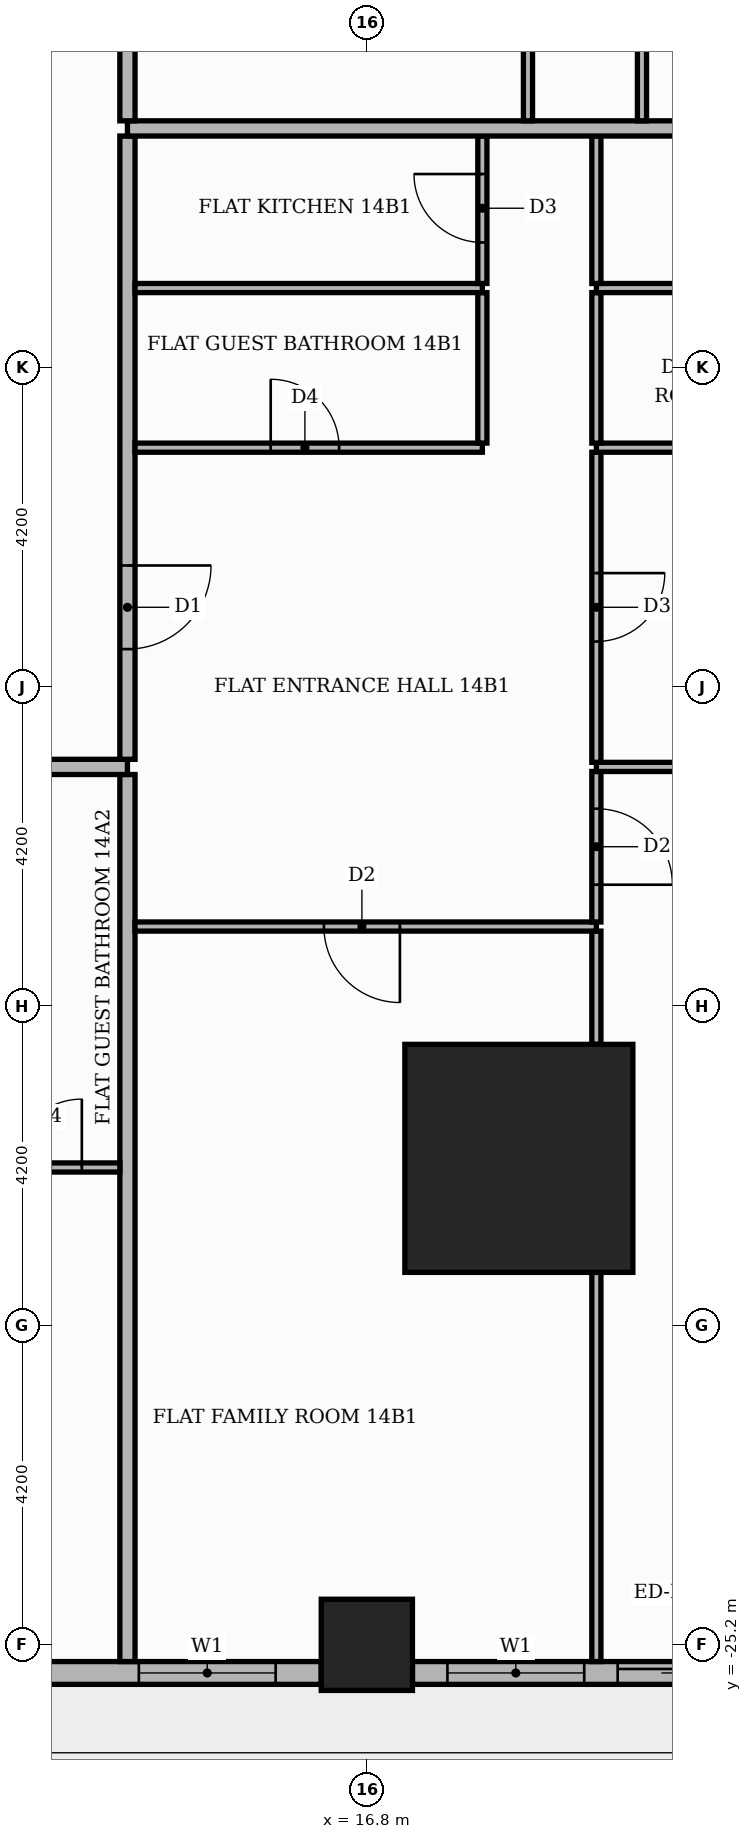
"""IFC4 building model, lengths in metres.
Left out: names, types, materials, properties, quantities, classifications, styles, units other than length and angle.
Written with IfcOpenShell. Run it as: python <this file> out.ifc"""

import sys

from ifc_helpers import new_model, si_unit, direction, frame, frame_2d, origin, origin_2d, place, context, subcontext, project, spatial, rectangle, extrude, element, fill, save


model = new_model("IFC4")
c1 = context("Model", 3, precision=1e-05, world=origin(), true_north=direction((0.0, 1.0)))
c2 = subcontext(c1, "Body", "Model", "MODEL_VIEW")
j1 = project(units=[si_unit("LENGTHUNIT", "METRE"), si_unit("PLANEANGLEUNIT", "RADIAN")], contexts=[c1])
p1 = place(None, origin())
s1 = spatial("IfcSite", under=j1, at=p1, CompositionType="ELEMENT")
p2 = place(p1, origin())
s2 = spatial("IfcBuilding", under=s1, at=p2, CompositionType="ELEMENT")
p3 = place(p2, frame((0.0, 0.0, 62.1)))
s3 = spatial("IfcBuildingStorey", under=s2, at=p3, CompositionType="ELEMENT", Elevation=62.1)
p4 = place(p3, frame((18.8, -18.8, 0.0), z_axis=(0.0, 0.0, 1.0), x_axis=(1.0, 0.0, 0.0)))
e1 = element("IfcColumn", 1, at=p4, inside=s3, PredefinedType="COLUMN", context=c2, shape_type="SweptSolid", body=[
    extrude(rectangle(XDim=3.0, YDim=3.0, at=origin_2d()), origin(), (0.0, 0.0, 1.0), 3.9),
])
p5 = place(p3, frame((16.8, -25.2, 0.0), z_axis=(0.0, 0.0, 1.0), x_axis=(1.0, 0.0, 0.0)))
e2 = element("IfcColumn", 2, at=p5, inside=s3, PredefinedType="COLUMN", context=c2, shape_type="SweptSolid", body=[
    extrude(rectangle(XDim=1.2, YDim=1.2, at=origin_2d()), origin(), (0.0, 0.0, 1.0), 3.9),
])
p6 = place(p3, frame((11.85, -25.57, 0.0), z_axis=(0.0, 0.0, 1.0), x_axis=(1.0, 0.0, 0.0)))
e3 = element("IfcWall", 3, at=p6, inside=s3, PredefinedType="STANDARD", context=c2, shape_type="SweptSolid", body=[
    extrude(rectangle(XDim=4.35, YDim=0.3, at=frame_2d((2.175, 0.0))), origin(), (0.0, 0.0, 1.0), 3.48),
])
p7 = place(p6, frame((1.95, 0.0, 0.9)))
e4 = element("IfcOpeningElement", 4, at=p7, cuts=e3, PredefinedType="OPENING", context=c2, shape_type="SweptSolid", body=[
    extrude(rectangle(XDim=1.8, YDim=2.1, at=frame_2d((0.9, 1.05))), frame((0.0, 0.16, 0.0), z_axis=(0.0, -1.0, 0.0), x_axis=(1.0, 0.0, 0.0)), (0.0, 0.0, 1.0), 0.32),
])
p8 = place(p3, frame((17.4, -25.57, 0.0), z_axis=(0.0, 0.0, 1.0), x_axis=(1.0, 0.0, 0.0)))
e5 = element("IfcWall", 5, at=p8, inside=s3, PredefinedType="STANDARD", context=c2, shape_type="SweptSolid", body=[
    extrude(rectangle(XDim=5.32, YDim=0.3, at=frame_2d((2.66, 0.0))), origin(), (0.0, 0.0, 1.0), 3.48),
])
p9 = place(p8, frame((2.7, 0.0, 0.0)))
e6 = element("IfcOpeningElement", 6, at=p9, cuts=e5, PredefinedType="OPENING", context=c2, shape_type="SweptSolid", body=[
    extrude(rectangle(XDim=1.8, YDim=2.4, at=frame_2d((0.9, 1.2))), frame((0.0, 0.16, 0.0), z_axis=(0.0, -1.0, 0.0), x_axis=(1.0, 0.0, 0.0)), (0.0, 0.0, 1.0), 0.32),
])
p10 = place(p8, frame((0.46, 0.0, 0.9)))
e7 = element("IfcOpeningElement", 7, at=p10, cuts=e5, PredefinedType="OPENING", context=c2, shape_type="SweptSolid", body=[
    extrude(rectangle(XDim=1.8, YDim=2.1, at=frame_2d((0.9, 1.05))), frame((0.0, 0.16, 0.0), z_axis=(0.0, -1.0, 0.0), x_axis=(1.0, 0.0, 0.0)), (0.0, 0.0, 1.0), 0.32),
])
p11 = place(p3, frame((13.65, -25.42, 0.0), z_axis=(0.0, 0.0, 1.0), x_axis=(0.0, 1.0, 0.0)))
e8 = element("IfcWall", 8, at=p11, inside=s3, PredefinedType="PARTITIONING", context=c2, shape_type="SweptSolid", body=[
    extrude(rectangle(XDim=11.67, YDim=0.2, at=frame_2d((5.835, 0.0))), origin(), (0.0, 0.0, 1.0), 3.48),
])
p12 = place(p3, frame((19.82, -25.42, 0.0), z_axis=(0.0, 0.0, 1.0), x_axis=(0.0, 1.0, 0.0)))
e9 = element("IfcWall", 9, at=p12, inside=s3, PredefinedType="PARTITIONING", context=c2, shape_type="SweptSolid", body=[
    extrude(rectangle(XDim=5.12, YDim=0.12, at=frame_2d((2.56, 0.0))), origin(), (0.0, 0.0, 1.0), 3.48),
])
p13 = place(p3, frame((-1.05, -18.92, 0.0), z_axis=(0.0, 0.0, 1.0), x_axis=(1.0, 0.0, 0.0)))
e10 = element("IfcWall", 10, at=p13, inside=s3, PredefinedType="PARTITIONING", context=c2, shape_type="SweptSolid", body=[
    extrude(rectangle(XDim=14.6, YDim=0.12, at=frame_2d((7.3, 0.0))), origin(), (0.0, 0.0, 1.0), 3.48),
])
p14 = place(p13, frame((2.7, 0.0, 0.0)))
e11 = element("IfcOpeningElement", 11, at=p14, cuts=e10, PredefinedType="OPENING", context=c2, shape_type="SweptSolid", body=[
    extrude(rectangle(XDim=0.9, YDim=2.1, at=frame_2d((0.45, 1.05))), frame((0.0, 0.07, 0.0), z_axis=(0.0, -1.0, 0.0), x_axis=(1.0, 0.0, 0.0)), (0.0, 0.0, 1.0), 0.14),
])
p15 = place(p13, frame((6.85, 0.0, 0.0)))
e12 = element("IfcOpeningElement", 12, at=p15, cuts=e10, PredefinedType="OPENING", context=c2, shape_type="SweptSolid", body=[
    extrude(rectangle(XDim=1.0, YDim=2.1, at=frame_2d((0.5, 1.05))), frame((0.0, 0.07, 0.0), z_axis=(0.0, -1.0, 0.0), x_axis=(1.0, 0.0, 0.0)), (0.0, 0.0, 1.0), 0.14),
])
p16 = place(p13, frame((10.05, 0.0, 0.0)))
e13 = element("IfcOpeningElement", 13, at=p16, cuts=e10, PredefinedType="OPENING", context=c2, shape_type="SweptSolid", body=[
    extrude(rectangle(XDim=0.9, YDim=2.1, at=frame_2d((0.45, 1.05))), frame((0.0, 0.07, 0.0), z_axis=(0.0, -1.0, 0.0), x_axis=(1.0, 0.0, 0.0)), (0.0, 0.0, 1.0), 0.14),
])
p17 = place(p13, frame((13.2, 0.0, 0.0)))
e14 = element("IfcOpeningElement", 14, at=p17, cuts=e10, PredefinedType="OPENING", context=c2, shape_type="SweptSolid", body=[
    extrude(rectangle(XDim=0.9, YDim=2.1, at=frame_2d((0.45, 1.05))), frame((0.0, 0.07, 0.0), z_axis=(0.0, -1.0, 0.0), x_axis=(1.0, 0.0, 0.0)), (0.0, 0.0, 1.0), 0.14),
])
p18 = place(p3, frame((19.82, -17.3, 0.0), z_axis=(0.0, 0.0, 1.0), x_axis=(0.0, 1.0, 0.0)))
e15 = element("IfcWall", 15, at=p18, inside=s3, PredefinedType="PARTITIONING", context=c2, shape_type="SweptSolid", body=[
    extrude(rectangle(XDim=1.49, YDim=0.12, at=frame_2d((0.745, 0.0))), origin(), (0.0, 0.0, 1.0), 3.48),
])
p19 = place(p3, frame((13.75, -15.75, 0.0), z_axis=(0.0, 0.0, 1.0), x_axis=(1.0, 0.0, 0.0)))
e16 = element("IfcWall", 16, at=p19, inside=s3, PredefinedType="PARTITIONING", context=c2, shape_type="SweptSolid", body=[
    extrude(rectangle(XDim=6.07, YDim=0.12, at=frame_2d((3.035, 0.0))), origin(), (0.0, 0.0, 1.0), 3.48),
])
p20 = place(p19, frame((2.485, 0.0, 0.0)))
e17 = element("IfcOpeningElement", 17, at=p20, cuts=e16, PredefinedType="OPENING", context=c2, shape_type="SweptSolid", body=[
    extrude(rectangle(XDim=1.0, YDim=2.1, at=frame_2d((0.5, 1.05))), frame((0.0, 0.07, 0.0), z_axis=(0.0, -1.0, 0.0), x_axis=(1.0, 0.0, 0.0)), (0.0, 0.0, 1.0), 0.14),
])
p21 = place(p3, frame((19.82, -15.69, 0.0), z_axis=(0.0, 0.0, 1.0), x_axis=(0.0, 1.0, 0.0)))
e18 = element("IfcWall", 18, at=p21, inside=s3, PredefinedType="PARTITIONING", context=c2, shape_type="SweptSolid", body=[
    extrude(rectangle(XDim=1.98, YDim=0.12, at=frame_2d((0.99, 0.0))), origin(), (0.0, 0.0, 1.0), 3.48),
])
p22 = place(p21, frame((0.49, 0.0, 0.0)))
e19 = element("IfcOpeningElement", 19, at=p22, cuts=e18, PredefinedType="OPENING", context=c2, shape_type="SweptSolid", body=[
    extrude(rectangle(XDim=1.0, YDim=2.1, at=frame_2d((0.5, 1.05))), frame((0.0, 0.07, 0.0), z_axis=(0.0, -1.0, 0.0), x_axis=(1.0, 0.0, 0.0)), (0.0, 0.0, 1.0), 0.14),
])
p23 = place(p3, frame((-25.42, -13.65, 0.0), z_axis=(0.0, 0.0, 1.0), x_axis=(1.0, 0.0, 0.0)))
e20 = element("IfcWall", 20, at=p23, inside=s3, PredefinedType="PARTITIONING", context=c2, shape_type="SweptSolid", body=[
    extrude(rectangle(XDim=39.07, YDim=0.2, at=frame_2d((19.535, 0.0))), origin(), (0.0, 0.0, 1.0), 3.48),
])
p24 = place(p23, frame((13.32, 0.0, 0.0)))
e21 = element("IfcOpeningElement", 21, at=p24, cuts=e20, PredefinedType="OPENING", context=c2, shape_type="SweptSolid", body=[
    extrude(rectangle(XDim=1.1, YDim=2.4, at=frame_2d((0.55, 1.2))), frame((0.0, 0.11, 0.0), z_axis=(0.0, -1.0, 0.0), x_axis=(1.0, 0.0, 0.0)), (0.0, 0.0, 1.0), 0.22),
])
p25 = place(p23, frame((21.72, 0.0, 0.0)))
e22 = element("IfcOpeningElement", 22, at=p25, cuts=e20, PredefinedType="OPENING", context=c2, shape_type="SweptSolid", body=[
    extrude(rectangle(XDim=1.1, YDim=2.4, at=frame_2d((0.55, 1.2))), frame((0.0, 0.11, 0.0), z_axis=(0.0, -1.0, 0.0), x_axis=(1.0, 0.0, 0.0)), (0.0, 0.0, 1.0), 0.22),
])
p26 = place(p3, frame((19.82, -13.65, 0.0), z_axis=(0.0, 0.0, 1.0), x_axis=(1.0, 0.0, 0.0)))
e23 = element("IfcWall", 23, at=p26, inside=s3, PredefinedType="PARTITIONING", context=c2, shape_type="SweptSolid", body=[
    extrude(rectangle(XDim=5.6, YDim=0.12, at=frame_2d((2.8, 0.0))), origin(), (0.0, 0.0, 1.0), 3.48),
])
p27 = place(p3, frame((19.82, -13.59, 0.0), z_axis=(0.0, 0.0, 1.0), x_axis=(0.0, 1.0, 0.0)))
e24 = element("IfcWall", 24, at=p27, inside=s3, PredefinedType="PARTITIONING", context=c2, shape_type="SweptSolid", body=[
    extrude(rectangle(XDim=4.08, YDim=0.12, at=frame_2d((2.04, 0.0))), origin(), (0.0, 0.0, 1.0), 3.48),
])
p28 = place(p27, frame((1.59, 0.0, 0.0)))
e25 = element("IfcOpeningElement", 25, at=p28, cuts=e24, PredefinedType="OPENING", context=c2, shape_type="SweptSolid", body=[
    extrude(rectangle(XDim=0.9, YDim=2.1, at=frame_2d((0.45, 1.05))), frame((0.0, 0.07, 0.0), z_axis=(0.0, -1.0, 0.0), x_axis=(1.0, 0.0, 0.0)), (0.0, 0.0, 1.0), 0.14),
])
p29 = place(p3, frame((13.65, -13.55, 0.0), z_axis=(0.0, 0.0, 1.0), x_axis=(0.0, 1.0, 0.0)))
e26 = element("IfcWall", 26, at=p29, inside=s3, PredefinedType="PARTITIONING", context=c2, shape_type="SweptSolid", body=[
    extrude(rectangle(XDim=8.2, YDim=0.2, at=frame_2d((4.1, 0.0))), origin(), (0.0, 0.0, 1.0), 3.48),
])
p30 = place(p29, frame((1.45, 0.0, 0.0)))
e27 = element("IfcOpeningElement", 27, at=p30, cuts=e26, PredefinedType="OPENING", context=c2, shape_type="SweptSolid", body=[
    extrude(rectangle(XDim=1.1, YDim=2.4, at=frame_2d((0.55, 1.2))), frame((0.0, 0.11, 0.0), z_axis=(0.0, -1.0, 0.0), x_axis=(1.0, 0.0, 0.0)), (0.0, 0.0, 1.0), 0.22),
])
p31 = place(p3, frame((13.75, -9.45, 0.0), z_axis=(0.0, 0.0, 1.0), x_axis=(1.0, 0.0, 0.0)))
e28 = element("IfcWall", 28, at=p31, inside=s3, PredefinedType="PARTITIONING", context=c2, shape_type="SweptSolid", body=[
    extrude(rectangle(XDim=4.57, YDim=0.12, at=frame_2d((2.285, 0.0))), origin(), (0.0, 0.0, 1.0), 3.48),
])
p32 = place(p31, frame((1.785, 0.0, 0.0)))
e29 = element("IfcOpeningElement", 29, at=p32, cuts=e28, PredefinedType="OPENING", context=c2, shape_type="SweptSolid", body=[
    extrude(rectangle(XDim=0.9, YDim=2.1, at=frame_2d((0.45, 1.05))), frame((0.0, 0.07, 0.0), z_axis=(0.0, -1.0, 0.0), x_axis=(1.0, 0.0, 0.0)), (0.0, 0.0, 1.0), 0.14),
])
p33 = place(p3, frame((19.82, -9.45, 0.0), z_axis=(0.0, 0.0, 1.0), x_axis=(1.0, 0.0, 0.0)))
e30 = element("IfcWall", 30, at=p33, inside=s3, PredefinedType="PARTITIONING", context=c2, shape_type="SweptSolid", body=[
    extrude(rectangle(XDim=5.6, YDim=0.12, at=frame_2d((2.8, 0.0))), origin(), (0.0, 0.0, 1.0), 3.48),
])
p34 = place(p33, frame((2.5, 0.0, 0.0)))
e31 = element("IfcOpeningElement", 31, at=p34, cuts=e30, PredefinedType="OPENING", context=c2, shape_type="SweptSolid", body=[
    extrude(rectangle(XDim=0.9, YDim=2.1, at=frame_2d((0.45, 1.05))), frame((0.0, 0.07, 0.0), z_axis=(0.0, -1.0, 0.0), x_axis=(1.0, 0.0, 0.0)), (0.0, 0.0, 1.0), 0.14),
])
for number, where, z_axis, x_axis in (
    (32, (18.32, -9.39, 0.0), (0.0, 0.0, 1.0), (0.0, 1.0, 0.0)),
    (33, (19.82, -9.39, 0.0), (0.0, 0.0, 1.0), (0.0, 1.0, 0.0)),
):
    element("IfcWall", number, at=place(p3, frame(where, z_axis=z_axis, x_axis=x_axis)), inside=s3, PredefinedType="PARTITIONING", context=c2, shape_type="SweptSolid", body=[
        extrude(rectangle(XDim=1.98, YDim=0.12, at=frame_2d((0.99, 0.0))), origin(), (0.0, 0.0, 1.0), 3.48),
    ])
p35 = place(p3, frame((13.75, -7.35, 0.0), z_axis=(0.0, 0.0, 1.0), x_axis=(1.0, 0.0, 0.0)))
e34 = element("IfcWall", 34, at=p35, inside=s3, PredefinedType="PARTITIONING", context=c2, shape_type="SweptSolid", body=[
    extrude(rectangle(XDim=4.57, YDim=0.12, at=frame_2d((2.285, 0.0))), origin(), (0.0, 0.0, 1.0), 3.48),
])
p36 = place(p3, frame((19.82, -7.35, 0.0), z_axis=(0.0, 0.0, 1.0), x_axis=(1.0, 0.0, 0.0)))
e35 = element("IfcWall", 35, at=p36, inside=s3, PredefinedType="PARTITIONING", context=c2, shape_type="SweptSolid", body=[
    extrude(rectangle(XDim=5.6, YDim=0.12, at=frame_2d((2.8, 0.0))), origin(), (0.0, 0.0, 1.0), 3.48),
])
p37 = place(p36, frame((2.5, 0.0, 0.0)))
e36 = element("IfcOpeningElement", 36, at=p37, cuts=e35, PredefinedType="OPENING", context=c2, shape_type="SweptSolid", body=[
    extrude(rectangle(XDim=0.9, YDim=2.1, at=frame_2d((0.45, 1.05))), frame((0.0, 0.07, 0.0), z_axis=(0.0, -1.0, 0.0), x_axis=(1.0, 0.0, 0.0)), (0.0, 0.0, 1.0), 0.14),
])
p38 = place(p3, frame((18.32, -7.29, 0.0), z_axis=(0.0, 0.0, 1.0), x_axis=(0.0, 1.0, 0.0)))
e37 = element("IfcWall", 37, at=p38, inside=s3, PredefinedType="PARTITIONING", context=c2, shape_type="SweptSolid", body=[
    extrude(rectangle(XDim=1.94, YDim=0.12, at=frame_2d((0.97, 0.0))), origin(), (0.0, 0.0, 1.0), 3.48),
])
p39 = place(p38, frame((0.54, 0.0, 0.0)))
e38 = element("IfcOpeningElement", 38, at=p39, cuts=e37, PredefinedType="OPENING", context=c2, shape_type="SweptSolid", body=[
    extrude(rectangle(XDim=0.9, YDim=2.1, at=frame_2d((0.45, 1.05))), frame((0.0, 0.07, 0.0), z_axis=(0.0, -1.0, 0.0), x_axis=(1.0, 0.0, 0.0)), (0.0, 0.0, 1.0), 0.14),
])
p40 = place(p3, frame((19.82, -7.29, 0.0), z_axis=(0.0, 0.0, 1.0), x_axis=(0.0, 1.0, 0.0)))
e39 = element("IfcWall", 39, at=p40, inside=s3, PredefinedType="PARTITIONING", context=c2, shape_type="SweptSolid", body=[
    extrude(rectangle(XDim=1.94, YDim=0.12, at=frame_2d((0.97, 0.0))), origin(), (0.0, 0.0, 1.0), 3.48),
])
p41 = place(p3, frame((13.65, -5.25, 0.0), z_axis=(0.0, 0.0, 1.0), x_axis=(1.0, 0.0, 0.0)))
e40 = element("IfcWall", 40, at=p41, inside=s3, PredefinedType="PARTITIONING", context=c2, shape_type="SweptSolid", body=[
    extrude(rectangle(XDim=11.77, YDim=0.2, at=frame_2d((5.885, 0.0))), origin(), (0.0, 0.0, 1.0), 3.48),
])
p42 = place(p3, frame((13.65, -5.15, 0.0), z_axis=(0.0, 0.0, 1.0), x_axis=(0.0, 1.0, 0.0)))
e41 = element("IfcWall", 41, at=p42, inside=s3, PredefinedType="PARTITIONING", context=c2, shape_type="SweptSolid", body=[
    extrude(rectangle(XDim=18.7, YDim=0.2, at=frame_2d((9.35, 0.0))), origin(), (0.0, 0.0, 1.0), 3.48),
])
p43 = place(p42, frame((5.65, 0.0, 0.0)))
e42 = element("IfcOpeningElement", 42, at=p43, cuts=e41, PredefinedType="OPENING", context=c2, shape_type="SweptSolid", body=[
    extrude(rectangle(XDim=1.1, YDim=2.4, at=frame_2d((0.55, 1.2))), frame((0.0, 0.11, 0.0), z_axis=(0.0, -1.0, 0.0), x_axis=(1.0, 0.0, 0.0)), (0.0, 0.0, 1.0), 0.22),
])
p44 = place(p3, frame((18.92, -5.15, 0.0), z_axis=(0.0, 0.0, 1.0), x_axis=(0.0, 1.0, 0.0)))
e43 = element("IfcWall", 43, at=p44, inside=s3, PredefinedType="PARTITIONING", context=c2, shape_type="SweptSolid", body=[
    extrude(rectangle(XDim=4.04, YDim=0.12, at=frame_2d((2.02, 0.0))), origin(), (0.0, 0.0, 1.0), 3.48),
])
p45 = place(p3, frame((20.42, -5.15, 0.0), z_axis=(0.0, 0.0, 1.0), x_axis=(0.0, 1.0, 0.0)))
e44 = element("IfcWall", 44, at=p45, inside=s3, PredefinedType="PARTITIONING", context=c2, shape_type="SweptSolid", body=[
    extrude(rectangle(XDim=4.04, YDim=0.12, at=frame_2d((2.02, 0.0))), origin(), (0.0, 0.0, 1.0), 3.48),
])
p46 = place(p45, frame((1.5, 0.0, 0.0)))
e45 = element("IfcOpeningElement", 45, at=p46, cuts=e44, PredefinedType="OPENING", context=c2, shape_type="SweptSolid", body=[
    extrude(rectangle(XDim=1.0, YDim=2.1, at=frame_2d((0.5, 1.05))), frame((0.0, 0.07, 0.0), z_axis=(0.0, -1.0, 0.0), x_axis=(1.0, 0.0, 0.0)), (0.0, 0.0, 1.0), 0.14),
])
p47 = place(p7, origin())
e46 = element("IfcWindow", 46, at=p47, inside=s3, PartitioningType="SINGLE_PANEL", PredefinedType="WINDOW", context=c2, shape_type="SweptSolid", body=[
    extrude(rectangle(XDim=1.8, YDim=2.1, at=frame_2d((0.9, 1.05))), frame((0.0, 0.03, 0.0), z_axis=(0.0, -1.0, 0.0), x_axis=(1.0, 0.0, 0.0)), (0.0, 0.0, 1.0), 0.06),
])
fill(e4, e46)
p48 = place(p9, origin())
e47 = element("IfcDoor", 47, at=p48, inside=s3, OperationType="SLIDING_TO_LEFT", PredefinedType="DOOR", context=c2, shape_type="SweptSolid", body=[
    extrude(rectangle(XDim=1.8, YDim=2.4, at=frame_2d((0.9, 1.2))), frame((0.0, 0.025, 0.0), z_axis=(0.0, -1.0, 0.0), x_axis=(1.0, 0.0, 0.0)), (0.0, 0.0, 1.0), 0.05),
])
fill(e6, e47)
p49 = place(p10, origin())
e48 = element("IfcWindow", 48, at=p49, inside=s3, PartitioningType="SINGLE_PANEL", PredefinedType="WINDOW", context=c2, shape_type="SweptSolid", body=[
    extrude(rectangle(XDim=1.8, YDim=2.1, at=frame_2d((0.9, 1.05))), frame((0.0, 0.03, 0.0), z_axis=(0.0, -1.0, 0.0), x_axis=(1.0, 0.0, 0.0)), (0.0, 0.0, 1.0), 0.06),
])
fill(e7, e48)
p50 = place(p17, origin())
e49 = element("IfcDoor", 49, at=p50, inside=s3, OperationType="SINGLE_SWING_RIGHT", PredefinedType="DOOR", context=c2, shape_type="SweptSolid", body=[
    extrude(rectangle(XDim=0.9, YDim=2.1, at=frame_2d((0.45, 1.05))), frame((0.0, 0.025, 0.0), z_axis=(0.0, -1.0, 0.0), x_axis=(1.0, 0.0, 0.0)), (0.0, 0.0, 1.0), 0.05),
])
fill(e14, e49)
p51 = place(p30, frame((1.1, 0.0, 0.0), z_axis=(0.0, 0.0, 1.0), x_axis=(-1.0, 0.0, 0.0)))
e50 = element("IfcDoor", 50, at=p51, inside=s3, OperationType="SINGLE_SWING_RIGHT", PredefinedType="DOOR", context=c2, shape_type="SweptSolid", body=[
    extrude(rectangle(XDim=1.1, YDim=2.4, at=frame_2d((0.55, 1.2))), frame((0.0, 0.025, 0.0), z_axis=(0.0, -1.0, 0.0), x_axis=(1.0, 0.0, 0.0)), (0.0, 0.0, 1.0), 0.05),
])
fill(e27, e50)
p52 = place(p20, frame((1.0, 0.0, 0.0), z_axis=(0.0, 0.0, 1.0), x_axis=(-1.0, 0.0, 0.0)))
e51 = element("IfcDoor", 51, at=p52, inside=s3, OperationType="SINGLE_SWING_RIGHT", PredefinedType="DOOR", context=c2, shape_type="SweptSolid", body=[
    extrude(rectangle(XDim=1.0, YDim=2.1, at=frame_2d((0.5, 1.05))), frame((0.0, 0.025, 0.0), z_axis=(0.0, -1.0, 0.0), x_axis=(1.0, 0.0, 0.0)), (0.0, 0.0, 1.0), 0.05),
])
fill(e17, e51)
p53 = place(p32, origin())
e52 = element("IfcDoor", 52, at=p53, inside=s3, OperationType="SINGLE_SWING_LEFT", PredefinedType="DOOR", context=c2, shape_type="SweptSolid", body=[
    extrude(rectangle(XDim=0.9, YDim=2.1, at=frame_2d((0.45, 1.05))), frame((0.0, 0.025, 0.0), z_axis=(0.0, -1.0, 0.0), x_axis=(1.0, 0.0, 0.0)), (0.0, 0.0, 1.0), 0.05),
])
fill(e29, e52)
p54 = place(p39, origin())
e53 = element("IfcDoor", 53, at=p54, inside=s3, OperationType="SINGLE_SWING_RIGHT", PredefinedType="DOOR", context=c2, shape_type="SweptSolid", body=[
    extrude(rectangle(XDim=0.9, YDim=2.1, at=frame_2d((0.45, 1.05))), frame((0.0, 0.025, 0.0), z_axis=(0.0, -1.0, 0.0), x_axis=(1.0, 0.0, 0.0)), (0.0, 0.0, 1.0), 0.05),
])
fill(e38, e53)
p55 = place(p22, frame((1.0, 0.0, 0.0), z_axis=(0.0, 0.0, 1.0), x_axis=(-1.0, 0.0, 0.0)))
e54 = element("IfcDoor", 54, at=p55, inside=s3, OperationType="SINGLE_SWING_LEFT", PredefinedType="DOOR", context=c2, shape_type="SweptSolid", body=[
    extrude(rectangle(XDim=1.0, YDim=2.1, at=frame_2d((0.5, 1.05))), frame((0.0, 0.025, 0.0), z_axis=(0.0, -1.0, 0.0), x_axis=(1.0, 0.0, 0.0)), (0.0, 0.0, 1.0), 0.05),
])
fill(e19, e54)
p56 = place(p28, frame((0.9, 0.0, 0.0), z_axis=(0.0, 0.0, 1.0), x_axis=(-1.0, 0.0, 0.0)))
e55 = element("IfcDoor", 55, at=p56, inside=s3, OperationType="SINGLE_SWING_RIGHT", PredefinedType="DOOR", context=c2, shape_type="SweptSolid", body=[
    extrude(rectangle(XDim=0.9, YDim=2.1, at=frame_2d((0.45, 1.05))), frame((0.0, 0.025, 0.0), z_axis=(0.0, -1.0, 0.0), x_axis=(1.0, 0.0, 0.0)), (0.0, 0.0, 1.0), 0.05),
])
fill(e25, e55)
save(model, sys.argv[1])
